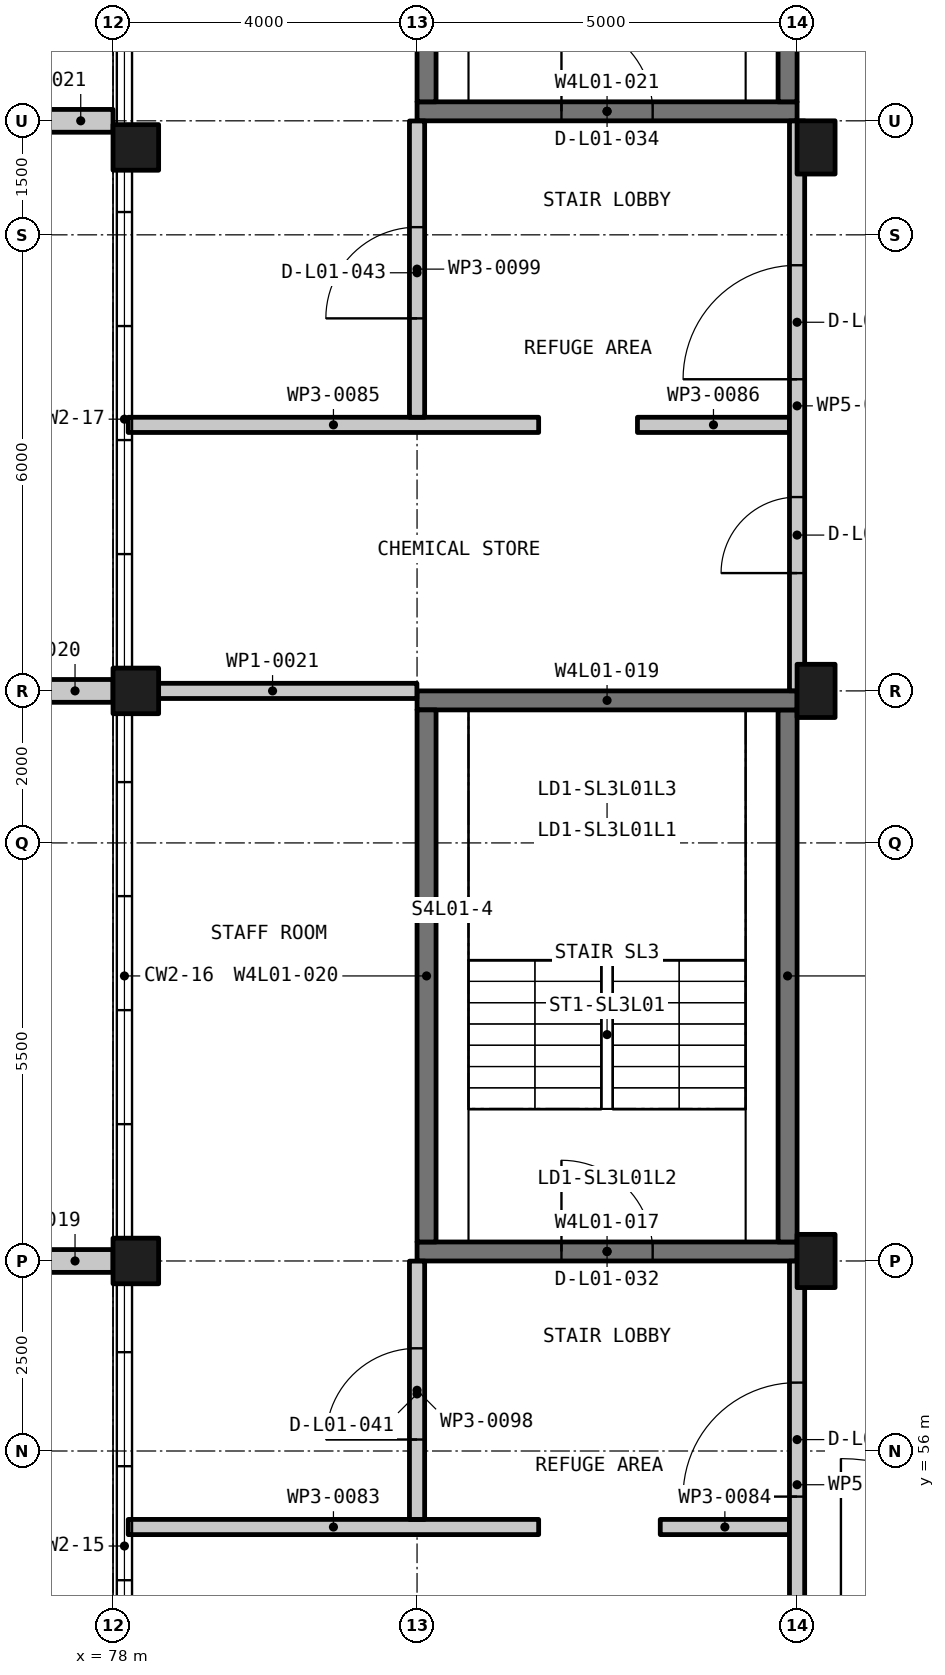
"""IFC4 building model, lengths in metres.
Left out: names, types, materials, properties, quantities, classifications, styles, units other than length and angle.
Written with IfcOpenShell. Run it as: python <this file> out.ifc"""

import sys

from ifc_helpers import new_model, si_unit, direction, frame, frame_2d, origin, origin_2d, place, context, subcontext, project, spatial, rectangle, extrude, element, fill, save


model = new_model("IFC4")
c1 = context("Model", 3, precision=1e-05, world=origin(), true_north=direction((0.0, 1.0)))
c2 = subcontext(c1, "Body", "Model", "MODEL_VIEW")
j1 = project(units=[si_unit("LENGTHUNIT", "METRE"), si_unit("PLANEANGLEUNIT", "RADIAN")], contexts=[c1])
p1 = place(None, origin())
s1 = spatial("IfcSite", under=j1, at=p1, CompositionType="ELEMENT")
p2 = place(p1, origin())
s2 = spatial("IfcBuilding", under=s1, at=p2, CompositionType="ELEMENT")
p3 = place(p2, frame((0.0, 0.0, 6.0)))
s3 = spatial("IfcBuildingStorey", under=s2, at=p3, CompositionType="ELEMENT", Elevation=6.0)
for number, where, z_axis, x_axis in (
    (1, (78.3, 58.5, -0.3), (0.0, 0.0, 1.0), (1.0, 0.0, 0.0)),
    (2, (78.3, 66.0, -0.3), (0.0, 0.0, 1.0), (1.0, 0.0, 0.0)),
    (3, (78.3, 73.15, -0.3), (0.0, 0.0, 1.0), (1.0, 0.0, 0.0)),
):
    element("IfcColumn", number, at=place(p3, frame(where, z_axis=z_axis, x_axis=x_axis)), inside=s3, PredefinedType="COLUMN", context=c2, shape_type="SweptSolid", body=[
        extrude(rectangle(XDim=0.6, YDim=0.6, at=origin_2d()), origin(), (0.0, 0.0, 1.0), 5.25),
    ])
for number, where, z_axis, x_axis in (
    (4, (87.25, 58.5, -0.3), (0.0, 0.0, 1.0), (1.0, 0.0, 0.0)),
    (5, (87.25, 66.0, -0.3), (0.0, 0.0, 1.0), (1.0, 0.0, 0.0)),
    (6, (87.25, 73.15, -0.3), (0.0, 0.0, 1.0), (1.0, 0.0, 0.0)),
):
    element("IfcColumn", number, at=place(p3, frame(where, z_axis=z_axis, x_axis=x_axis)), inside=s3, PredefinedType="COLUMN", context=c2, shape_type="SweptSolid", body=[
        extrude(rectangle(XDim=0.5, YDim=0.7, at=origin_2d()), origin(), (0.0, 0.0, 1.0), 5.25),
    ])
p4 = place(p3, frame((82.0, 58.625, -0.3), z_axis=(0.0, 0.0, 1.0), x_axis=(1.0, 0.0, 0.0)))
e7 = element("IfcWall", 7, at=p4, inside=s3, PredefinedType="SHEAR", context=c2, shape_type="SweptSolid", body=[
    extrude(rectangle(XDim=5.0, YDim=0.25, at=frame_2d((2.5, 0.0))), origin(), (0.0, 0.0, 1.0), 5.25),
])
p5 = place(p4, frame((1.9, 0.0, 0.3)))
e8 = element("IfcOpeningElement", 8, at=p5, cuts=e7, PredefinedType="OPENING", context=c2, shape_type="SweptSolid", body=[
    extrude(rectangle(XDim=1.2, YDim=2.2, at=frame_2d((0.6, 1.1))), frame((0.0, 0.135, 0.0), z_axis=(0.0, -1.0, 0.0), x_axis=(1.0, 0.0, 0.0)), (0.0, 0.0, 1.0), 0.27),
])
p6 = place(p3, frame((86.875, 58.75, -0.3), z_axis=(0.0, 0.0, 1.0), x_axis=(0.0, 1.0, 0.0)))
e9 = element("IfcWall", 9, at=p6, inside=s3, PredefinedType="SHEAR", context=c2, shape_type="SweptSolid", body=[
    extrude(rectangle(XDim=7.0, YDim=0.25, at=frame_2d((3.5, 0.0))), origin(), (0.0, 0.0, 1.0), 5.25),
])
p7 = place(p3, frame((82.0, 65.875, -0.3), z_axis=(0.0, 0.0, 1.0), x_axis=(1.0, 0.0, 0.0)))
e10 = element("IfcWall", 10, at=p7, inside=s3, PredefinedType="SHEAR", context=c2, shape_type="SweptSolid", body=[
    extrude(rectangle(XDim=5.0, YDim=0.25, at=frame_2d((2.5, 0.0))), origin(), (0.0, 0.0, 1.0), 5.25),
])
p8 = place(p3, frame((82.125, 58.75, -0.3), z_axis=(0.0, 0.0, 1.0), x_axis=(0.0, 1.0, 0.0)))
e11 = element("IfcWall", 11, at=p8, inside=s3, PredefinedType="SHEAR", context=c2, shape_type="SweptSolid", body=[
    extrude(rectangle(XDim=7.0, YDim=0.25, at=frame_2d((3.5, 0.0))), origin(), (0.0, 0.0, 1.0), 5.25),
])
p9 = place(p3, frame((82.0, 73.625, -0.3), z_axis=(0.0, 0.0, 1.0), x_axis=(1.0, 0.0, 0.0)))
e12 = element("IfcWall", 12, at=p9, inside=s3, PredefinedType="SHEAR", context=c2, shape_type="SweptSolid", body=[
    extrude(rectangle(XDim=5.0, YDim=0.25, at=frame_2d((2.5, 0.0))), origin(), (0.0, 0.0, 1.0), 5.25),
])
p10 = place(p9, frame((1.9, 0.0, 0.3)))
e13 = element("IfcOpeningElement", 13, at=p10, cuts=e12, PredefinedType="OPENING", context=c2, shape_type="SweptSolid", body=[
    extrude(rectangle(XDim=1.2, YDim=2.2, at=frame_2d((0.6, 1.1))), frame((0.0, 0.135, 0.0), z_axis=(0.0, -1.0, 0.0), x_axis=(1.0, 0.0, 0.0)), (0.0, 0.0, 1.0), 0.27),
])
for number, where, z_axis, x_axis in (
    (14, (86.875, 73.75, -0.3), (0.0, 0.0, 1.0), (0.0, 1.0, 0.0)),
    (15, (82.125, 73.75, -0.3), (0.0, 0.0, 1.0), (0.0, 1.0, 0.0)),
):
    element("IfcWall", number, at=place(p3, frame(where, z_axis=z_axis, x_axis=x_axis)), inside=s3, PredefinedType="SHEAR", context=c2, shape_type="SweptSolid", body=[
        extrude(rectangle(XDim=7.0, YDim=0.25, at=frame_2d((3.5, 0.0))), origin(), (0.0, 0.0, 1.0), 5.25),
    ])
for number, where, z_axis, x_axis in (
    (16, (77.0, 58.5, 0.0), (0.0, 0.0, 1.0), (1.0, 0.0, 0.0)),
    (17, (77.0, 66.0, 0.0), (0.0, 0.0, 1.0), (1.0, 0.0, 0.0)),
):
    element("IfcWall", number, at=place(p3, frame(where, z_axis=z_axis, x_axis=x_axis)), inside=s3, PredefinedType="SOLIDWALL", context=c2, shape_type="SweptSolid", body=[
        extrude(rectangle(XDim=1.0, YDim=0.3, at=frame_2d((0.5, 0.0))), origin(), (0.0, 0.0, 1.0), 5.25),
    ])
p11 = place(p3, frame((77.15, 73.5, 0.0), z_axis=(0.0, 0.0, 1.0), x_axis=(1.0, 0.0, 0.0)))
e18 = element("IfcWall", 18, at=p11, inside=s3, PredefinedType="SOLIDWALL", context=c2, shape_type="SweptSolid", body=[
    extrude(rectangle(XDim=0.85, YDim=0.3, at=frame_2d((0.425, 0.0))), origin(), (0.0, 0.0, 1.0), 5.25),
])
p12 = place(p3, frame((78.2, 55.0, 0.0), z_axis=(0.0, 0.0, 1.0), x_axis=(1.0, 0.0, 0.0)))
e19 = element("IfcWall", 19, at=p12, inside=s3, PredefinedType="PARTITIONING", context=c2, shape_type="SweptSolid", body=[
    extrude(rectangle(XDim=5.4, YDim=0.2, at=frame_2d((2.7, 0.0))), origin(), (0.0, 0.0, 1.0), 4.15),
])
p13 = place(p3, frame((85.2, 55.0, 0.0), z_axis=(0.0, 0.0, 1.0), x_axis=(1.0, 0.0, 0.0)))
e20 = element("IfcWall", 20, at=p13, inside=s3, PredefinedType="PARTITIONING", context=c2, shape_type="SweptSolid", body=[
    extrude(rectangle(XDim=1.7, YDim=0.2, at=frame_2d((0.85, 0.0))), origin(), (0.0, 0.0, 1.0), 4.35),
])
p14 = place(p3, frame((78.2, 66.0, 0.0), z_axis=(0.0, 0.0, 1.0), x_axis=(1.0, 0.0, 0.0)))
e21 = element("IfcWall", 21, at=p14, inside=s3, PredefinedType="PARTITIONING", context=c2, shape_type="SweptSolid", body=[
    extrude(rectangle(XDim=3.798, YDim=0.2, at=frame_2d((1.899, 0.0))), origin(), (0.0, 0.0, 1.0), 4.15),
])
p15 = place(p3, frame((78.2, 69.5, 0.0), z_axis=(0.0, 0.0, 1.0), x_axis=(1.0, 0.0, 0.0)))
e22 = element("IfcWall", 22, at=p15, inside=s3, PredefinedType="PARTITIONING", context=c2, shape_type="SweptSolid", body=[
    extrude(rectangle(XDim=5.4, YDim=0.2, at=frame_2d((2.7, 0.0))), origin(), (0.0, 0.0, 1.0), 4.15),
])
p16 = place(p3, frame((84.9, 69.5, 0.0), z_axis=(0.0, 0.0, 1.0), x_axis=(1.0, 0.0, 0.0)))
e23 = element("IfcWall", 23, at=p16, inside=s3, PredefinedType="PARTITIONING", context=c2, shape_type="SweptSolid", body=[
    extrude(rectangle(XDim=2.0, YDim=0.2, at=frame_2d((1.0, 0.0))), origin(), (0.0, 0.0, 1.0), 4.35),
])
p17 = place(p3, frame((87.0, 52.615, 0.0), z_axis=(0.0, 0.0, 1.0), x_axis=(0.0, 1.0, 0.0)))
e24 = element("IfcWall", 24, at=p17, inside=s3, PredefinedType="PARTITIONING", context=c2, shape_type="SweptSolid", body=[
    extrude(rectangle(XDim=5.884, YDim=0.2, at=frame_2d((2.942, 0.0))), origin(), (0.0, 0.0, 1.0), 4.15),
])
p18 = place(p17, frame((2.785, 0.0, 0.0)))
e25 = element("IfcOpeningElement", 25, at=p18, cuts=e24, PredefinedType="OPENING", context=c2, shape_type="SweptSolid", body=[
    extrude(rectangle(XDim=1.5, YDim=2.1, at=frame_2d((0.75, 1.05))), frame((0.0, 0.11, 0.0), z_axis=(0.0, -1.0, 0.0), x_axis=(1.0, 0.0, 0.0)), (0.0, 0.0, 1.0), 0.22),
])
p19 = place(p3, frame((87.0, 66.002, 0.0), z_axis=(0.0, 0.0, 1.0), x_axis=(0.0, 1.0, 0.0)))
e26 = element("IfcWall", 26, at=p19, inside=s3, PredefinedType="PARTITIONING", context=c2, shape_type="SweptSolid", body=[
    extrude(rectangle(XDim=7.496, YDim=0.2, at=frame_2d((3.748, 0.0))), origin(), (0.0, 0.0, 1.0), 4.15),
])
p20 = place(p19, frame((4.098, 0.0, 0.0)))
e27 = element("IfcOpeningElement", 27, at=p20, cuts=e26, PredefinedType="OPENING", context=c2, shape_type="SweptSolid", body=[
    extrude(rectangle(XDim=1.5, YDim=2.1, at=frame_2d((0.75, 1.05))), frame((0.0, 0.11, 0.0), z_axis=(0.0, -1.0, 0.0), x_axis=(1.0, 0.0, 0.0)), (0.0, 0.0, 1.0), 0.22),
])
p21 = place(p19, frame((1.548, 0.0, 0.0)))
e28 = element("IfcOpeningElement", 28, at=p21, cuts=e26, PredefinedType="OPENING", context=c2, shape_type="SweptSolid", body=[
    extrude(rectangle(XDim=1.0, YDim=2.1, at=frame_2d((0.5, 1.05))), frame((0.0, 0.11, 0.0), z_axis=(0.0, -1.0, 0.0), x_axis=(1.0, 0.0, 0.0)), (0.0, 0.0, 1.0), 0.22),
])
p22 = place(p3, frame((82.0, 55.1, 0.0), z_axis=(0.0, 0.0, 1.0), x_axis=(0.0, 1.0, 0.0)))
e29 = element("IfcWall", 29, at=p22, inside=s3, PredefinedType="PARTITIONING", context=c2, shape_type="SweptSolid", body=[
    extrude(rectangle(XDim=3.398, YDim=0.2, at=frame_2d((1.699, 0.0))), origin(), (0.0, 0.0, 1.0), 4.15),
])
p23 = place(p22, frame((1.051, 0.0, 0.0)))
e30 = element("IfcOpeningElement", 30, at=p23, cuts=e29, PredefinedType="OPENING", context=c2, shape_type="SweptSolid", body=[
    extrude(rectangle(XDim=1.2, YDim=2.1, at=frame_2d((0.6, 1.05))), frame((0.0, 0.11, 0.0), z_axis=(0.0, -1.0, 0.0), x_axis=(1.0, 0.0, 0.0)), (0.0, 0.0, 1.0), 0.22),
])
p24 = place(p3, frame((82.0, 69.6, 0.0), z_axis=(0.0, 0.0, 1.0), x_axis=(0.0, 1.0, 0.0)))
e31 = element("IfcWall", 31, at=p24, inside=s3, PredefinedType="PARTITIONING", context=c2, shape_type="SweptSolid", body=[
    extrude(rectangle(XDim=3.898, YDim=0.2, at=frame_2d((1.949, 0.0))), origin(), (0.0, 0.0, 1.0), 4.15),
])
p25 = place(p24, frame((1.301, 0.0, 0.0)))
e32 = element("IfcOpeningElement", 32, at=p25, cuts=e31, PredefinedType="OPENING", context=c2, shape_type="SweptSolid", body=[
    extrude(rectangle(XDim=1.2, YDim=2.1, at=frame_2d((0.6, 1.05))), frame((0.0, 0.11, 0.0), z_axis=(0.0, -1.0, 0.0), x_axis=(1.0, 0.0, 0.0)), (0.0, 0.0, 1.0), 0.22),
])
p26 = place(p5, origin())
e33 = element("IfcDoor", 33, at=p26, inside=s3, OperationType="SINGLE_SWING_LEFT", PredefinedType="DOOR", context=c2, shape_type="SweptSolid", body=[
    extrude(rectangle(XDim=1.2, YDim=2.2, at=frame_2d((0.6, 1.1))), frame((0.0, 0.025, 0.0), z_axis=(0.0, -1.0, 0.0), x_axis=(1.0, 0.0, 0.0)), (0.0, 0.0, 1.0), 0.05),
])
fill(e8, e33)
p27 = place(p18, origin())
e34 = element("IfcDoor", 34, at=p27, inside=s3, OperationType="DOUBLE_DOOR_SINGLE_SWING", PredefinedType="DOOR", context=c2, shape_type="SweptSolid", body=[
    extrude(rectangle(XDim=1.5, YDim=2.1, at=frame_2d((0.75, 1.05))), frame((0.0, 0.025, 0.0), z_axis=(0.0, -1.0, 0.0), x_axis=(1.0, 0.0, 0.0)), (0.0, 0.0, 1.0), 0.05),
])
fill(e25, e34)
p28 = place(p10, origin())
e35 = element("IfcDoor", 35, at=p28, inside=s3, OperationType="SINGLE_SWING_LEFT", PredefinedType="DOOR", context=c2, shape_type="SweptSolid", body=[
    extrude(rectangle(XDim=1.2, YDim=2.2, at=frame_2d((0.6, 1.1))), frame((0.0, 0.025, 0.0), z_axis=(0.0, -1.0, 0.0), x_axis=(1.0, 0.0, 0.0)), (0.0, 0.0, 1.0), 0.05),
])
fill(e13, e35)
p29 = place(p20, origin())
e36 = element("IfcDoor", 36, at=p29, inside=s3, OperationType="DOUBLE_DOOR_SINGLE_SWING", PredefinedType="DOOR", context=c2, shape_type="SweptSolid", body=[
    extrude(rectangle(XDim=1.5, YDim=2.1, at=frame_2d((0.75, 1.05))), frame((0.0, 0.025, 0.0), z_axis=(0.0, -1.0, 0.0), x_axis=(1.0, 0.0, 0.0)), (0.0, 0.0, 1.0), 0.05),
])
fill(e27, e36)
p30 = place(p23, origin())
e37 = element("IfcDoor", 37, at=p30, inside=s3, OperationType="SINGLE_SWING_RIGHT", PredefinedType="DOOR", context=c2, shape_type="SweptSolid", body=[
    extrude(rectangle(XDim=1.2, YDim=2.1, at=frame_2d((0.6, 1.05))), frame((0.0, 0.025, 0.0), z_axis=(0.0, -1.0, 0.0), x_axis=(1.0, 0.0, 0.0)), (0.0, 0.0, 1.0), 0.05),
])
fill(e30, e37)
p31 = place(p21, origin())
e38 = element("IfcDoor", 38, at=p31, inside=s3, OperationType="SINGLE_SWING_RIGHT", PredefinedType="DOOR", context=c2, shape_type="SweptSolid", body=[
    extrude(rectangle(XDim=1.0, YDim=2.1, at=frame_2d((0.5, 1.05))), frame((0.0, 0.025, 0.0), z_axis=(0.0, -1.0, 0.0), x_axis=(1.0, 0.0, 0.0)), (0.0, 0.0, 1.0), 0.05),
])
fill(e28, e38)
p32 = place(p25, origin())
e39 = element("IfcDoor", 39, at=p32, inside=s3, OperationType="SINGLE_SWING_RIGHT", PredefinedType="DOOR", context=c2, shape_type="SweptSolid", body=[
    extrude(rectangle(XDim=1.2, YDim=2.1, at=frame_2d((0.6, 1.05))), frame((0.0, 0.025, 0.0), z_axis=(0.0, -1.0, 0.0), x_axis=(1.0, 0.0, 0.0)), (0.0, 0.0, 1.0), 0.05),
])
fill(e32, e39)
save(model, sys.argv[1])
